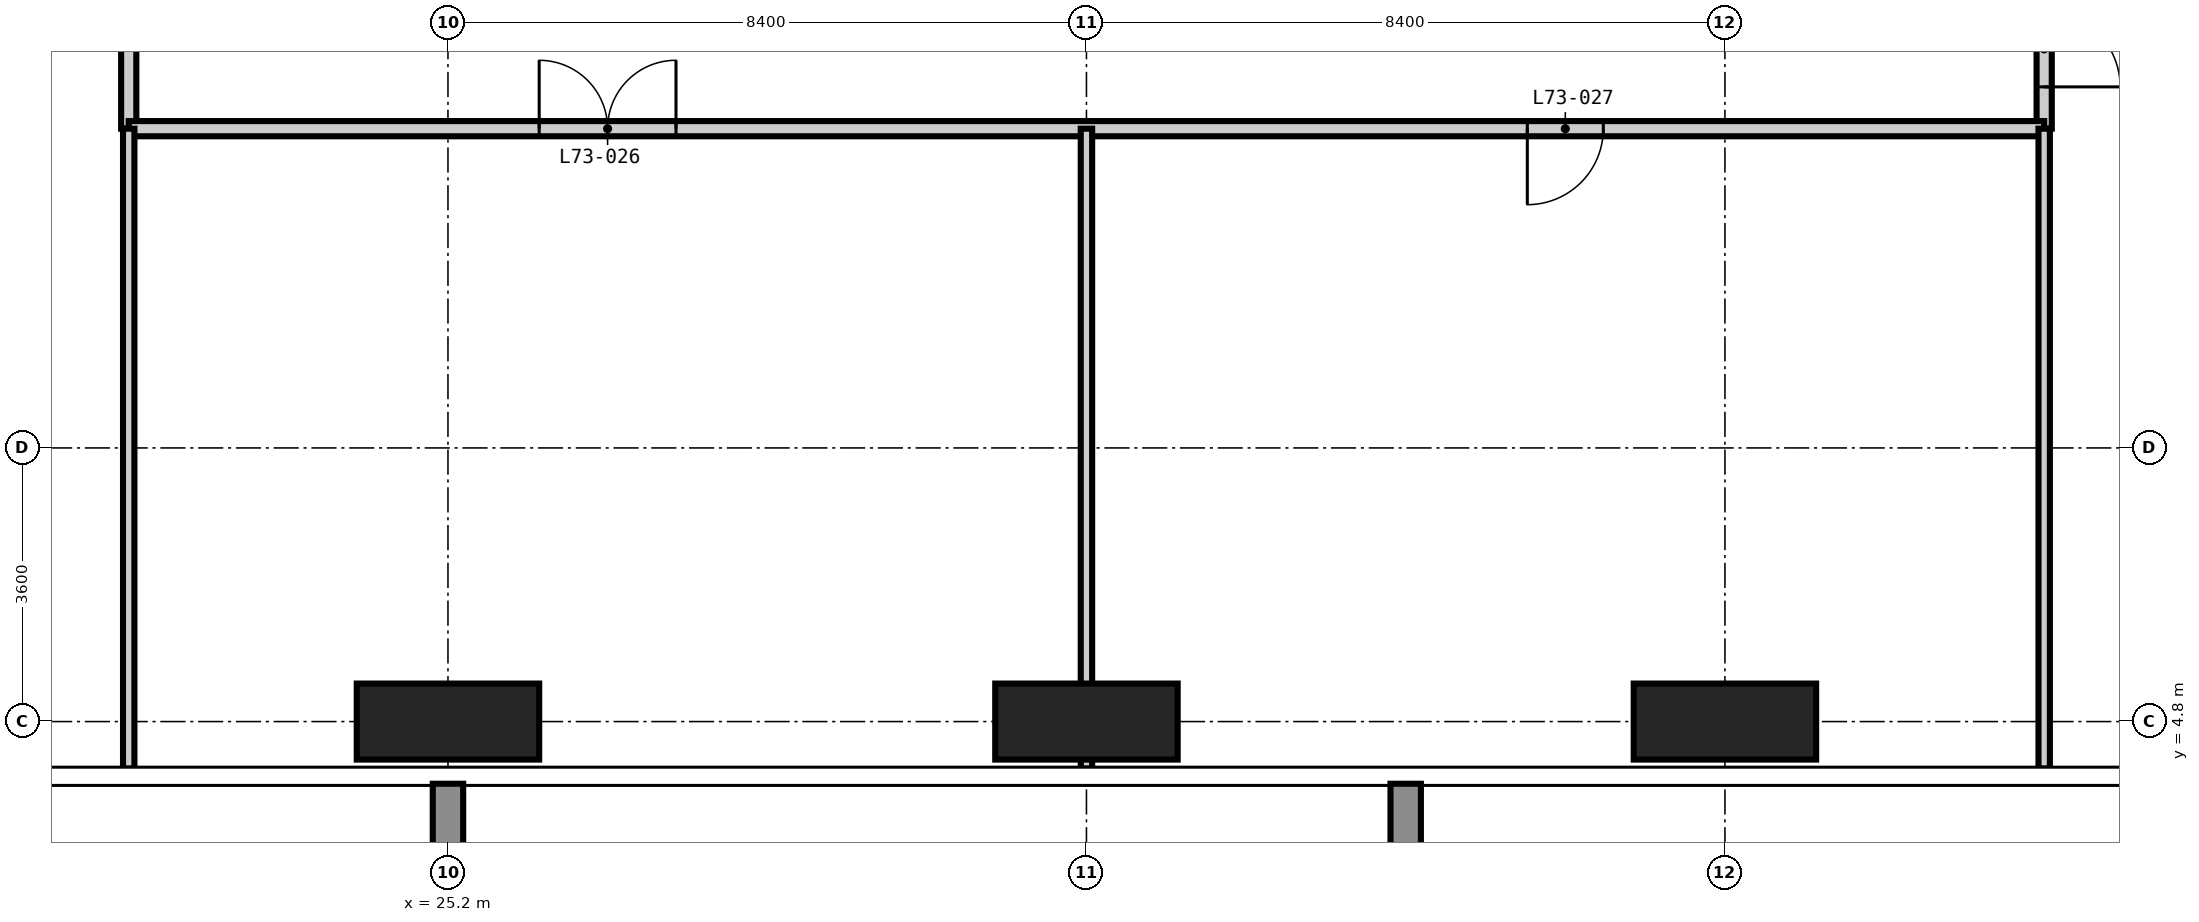
"""IFC4 building model, lengths in metres.
Left out: names, types, materials, properties, quantities, classifications, styles, units other than length and angle.
Written with IfcOpenShell. Run it as: python <this file> out.ifc"""

import sys

from ifc_helpers import new_model, si_unit, direction, frame, frame_2d, origin, origin_2d, place, context, subcontext, project, spatial, rectangle, extrude, element, fill, save


model = new_model("IFC4")
c1 = context("Model", 3, precision=1e-05, world=origin(), true_north=direction((0.0, 1.0)))
c2 = subcontext(c1, "Body", "Model", "MODEL_VIEW")
j1 = project(units=[si_unit("LENGTHUNIT", "METRE"), si_unit("PLANEANGLEUNIT", "RADIAN")], contexts=[c1])
p1 = place(None, origin())
s1 = spatial("IfcSite", under=j1, at=p1, CompositionType="ELEMENT")
p2 = place(p1, origin())
s2 = spatial("IfcBuilding", under=s1, at=p2, CompositionType="ELEMENT")
p3 = place(p2, frame((0.0, 0.0, 284.1)))
s3 = spatial("IfcBuildingStorey", under=s2, at=p3, CompositionType="ELEMENT", Elevation=284.1)
for number, where, z_axis, x_axis in (
    (1, (25.2, 4.8, -0.35), (0.0, 0.0, 1.0), (1.0, 0.0, 0.0)),
    (2, (33.6, 4.8, -0.35), (0.0, 0.0, 1.0), (1.0, 0.0, 0.0)),
    (3, (42.0, 4.8, -0.35), (0.0, 0.0, 1.0), (1.0, 0.0, 0.0)),
):
    element("IfcColumn", number, at=place(p3, frame(where, z_axis=z_axis, x_axis=x_axis)), inside=s3, PredefinedType="COLUMN", context=c2, shape_type="SweptSolid", body=[
        extrude(rectangle(XDim=2.4, YDim=1.0, at=origin_2d()), origin(), (0.0, 0.0, 1.0), 5.0),
    ])
p4 = place(p3, frame((21.0, 12.6, 0.0), z_axis=(0.0, 0.0, 1.0), x_axis=(0.0, 1.0, 0.0)))
e4 = element("IfcWall", 4, at=p4, inside=s3, PredefinedType="PARTITIONING", context=c2, shape_type="SweptSolid", body=[
    extrude(rectangle(XDim=21.0, YDim=0.2, at=frame_2d((10.5, 0.0))), origin(), (0.0, 0.0, 1.0), 4.65),
])
p5 = place(p4, frame((15.9, 0.0, 0.0)))
e5 = element("IfcOpeningElement", 5, at=p5, cuts=e4, PredefinedType="OPENING", context=c2, shape_type="SweptSolid", body=[
    extrude(rectangle(XDim=1.8, YDim=2.4, at=frame_2d((0.9, 1.2))), frame((0.0, 0.11, 0.0), z_axis=(0.0, -1.0, 0.0), x_axis=(1.0, 0.0, 0.0)), (0.0, 0.0, 1.0), 0.22),
])
p6 = place(p4, frame((5.8, 0.0, 0.0)))
e6 = element("IfcOpeningElement", 6, at=p6, cuts=e4, PredefinedType="OPENING", context=c2, shape_type="SweptSolid", body=[
    extrude(rectangle(XDim=1.0, YDim=2.1, at=frame_2d((0.5, 1.05))), frame((0.0, 0.11, 0.0), z_axis=(0.0, -1.0, 0.0), x_axis=(1.0, 0.0, 0.0)), (0.0, 0.0, 1.0), 0.22),
])
p7 = place(p3, frame((46.2, 12.6, 0.0), z_axis=(0.0, 0.0, 1.0), x_axis=(0.0, 1.0, 0.0)))
e7 = element("IfcWall", 7, at=p7, inside=s3, PredefinedType="PARTITIONING", context=c2, shape_type="SweptSolid", body=[
    extrude(rectangle(XDim=12.6, YDim=0.2, at=frame_2d((6.3, 0.0))), origin(), (0.0, 0.0, 1.0), 4.65),
])
p8 = place(p7, frame((4.35, 0.0, 0.0)))
e8 = element("IfcOpeningElement", 8, at=p8, cuts=e7, PredefinedType="OPENING", context=c2, shape_type="SweptSolid", body=[
    extrude(rectangle(XDim=1.8, YDim=2.4, at=frame_2d((0.9, 1.2))), frame((0.0, 0.11, 0.0), z_axis=(0.0, -1.0, 0.0), x_axis=(1.0, 0.0, 0.0)), (0.0, 0.0, 1.0), 0.22),
])
p9 = place(p7, frame((0.55, 0.0, 0.0)))
e9 = element("IfcOpeningElement", 9, at=p9, cuts=e7, PredefinedType="OPENING", context=c2, shape_type="SweptSolid", body=[
    extrude(rectangle(XDim=1.0, YDim=2.1, at=frame_2d((0.5, 1.05))), frame((0.0, 0.11, 0.0), z_axis=(0.0, -1.0, 0.0), x_axis=(1.0, 0.0, 0.0)), (0.0, 0.0, 1.0), 0.22),
])
p10 = place(p7, frame((10.0, 0.0, 0.0)))
e10 = element("IfcOpeningElement", 10, at=p10, cuts=e7, PredefinedType="OPENING", context=c2, shape_type="SweptSolid", body=[
    extrude(rectangle(XDim=1.0, YDim=2.1, at=frame_2d((0.5, 1.05))), frame((0.0, 0.11, 0.0), z_axis=(0.0, -1.0, 0.0), x_axis=(1.0, 0.0, 0.0)), (0.0, 0.0, 1.0), 0.22),
])
p11 = place(p3, frame((21.0, 12.6, 0.0), z_axis=(0.0, 0.0, 1.0), x_axis=(1.0, 0.0, 0.0)))
e11 = element("IfcWall", 11, at=p11, inside=s3, PredefinedType="PARTITIONING", context=c2, shape_type="SweptSolid", body=[
    extrude(rectangle(XDim=25.2, YDim=0.2, at=frame_2d((12.6, 0.0))), origin(), (0.0, 0.0, 1.0), 4.65),
])
p12 = place(p11, frame((5.4, 0.0, 0.0)))
e12 = element("IfcOpeningElement", 12, at=p12, cuts=e11, PredefinedType="OPENING", context=c2, shape_type="SweptSolid", body=[
    extrude(rectangle(XDim=1.8, YDim=2.4, at=frame_2d((0.9, 1.2))), frame((0.0, 0.11, 0.0), z_axis=(0.0, -1.0, 0.0), x_axis=(1.0, 0.0, 0.0)), (0.0, 0.0, 1.0), 0.22),
])
p13 = place(p11, frame((18.4, 0.0, 0.0)))
e13 = element("IfcOpeningElement", 13, at=p13, cuts=e11, PredefinedType="OPENING", context=c2, shape_type="SweptSolid", body=[
    extrude(rectangle(XDim=1.0, YDim=2.1, at=frame_2d((0.5, 1.05))), frame((0.0, 0.11, 0.0), z_axis=(0.0, -1.0, 0.0), x_axis=(1.0, 0.0, 0.0)), (0.0, 0.0, 1.0), 0.22),
])
for number, where, z_axis, x_axis in (
    (14, (21.0, 4.182, 0.0), (0.0, 0.0, 1.0), (0.0, 1.0, 0.0)),
    (15, (33.6, 4.182, 0.0), (0.0, 0.0, 1.0), (0.0, 1.0, 0.0)),
    (16, (46.2, 4.182, 0.0), (0.0, 0.0, 1.0), (0.0, 1.0, 0.0)),
):
    element("IfcWall", number, at=place(p3, frame(where, z_axis=z_axis, x_axis=x_axis)), inside=s3, PredefinedType="PARTITIONING", context=c2, shape_type="SweptSolid", body=[
        extrude(rectangle(XDim=8.418, YDim=0.15, at=frame_2d((4.209, 0.0))), origin(), (0.0, 0.0, 1.0), 4.65),
    ])
p14 = place(p12, origin())
e17 = element("IfcDoor", 17, at=p14, inside=s3, OperationType="DOUBLE_DOOR_DOUBLE_SWING", PredefinedType="DOOR", context=c2, shape_type="SweptSolid", body=[
    extrude(rectangle(XDim=1.8, YDim=2.4, at=frame_2d((0.9, 1.2))), frame((0.0, 0.025, 0.0), z_axis=(0.0, -1.0, 0.0), x_axis=(1.0, 0.0, 0.0)), (0.0, 0.0, 1.0), 0.05),
])
fill(e12, e17)
p15 = place(p13, frame((1.0, 0.0, 0.0), z_axis=(0.0, 0.0, 1.0), x_axis=(-1.0, 0.0, 0.0)))
e18 = element("IfcDoor", 18, at=p15, inside=s3, OperationType="SINGLE_SWING_RIGHT", PredefinedType="DOOR", context=c2, shape_type="SweptSolid", body=[
    extrude(rectangle(XDim=1.0, YDim=2.1, at=frame_2d((0.5, 1.05))), frame((0.0, 0.025, 0.0), z_axis=(0.0, -1.0, 0.0), x_axis=(1.0, 0.0, 0.0)), (0.0, 0.0, 1.0), 0.05),
])
fill(e13, e18)
p16 = place(p9, frame((1.0, 0.0, 0.0), z_axis=(0.0, 0.0, 1.0), x_axis=(-1.0, 0.0, 0.0)))
e19 = element("IfcDoor", 19, at=p16, inside=s3, OperationType="SINGLE_SWING_RIGHT", PredefinedType="DOOR", context=c2, shape_type="SweptSolid", body=[
    extrude(rectangle(XDim=1.0, YDim=2.1, at=frame_2d((0.5, 1.05))), frame((0.0, 0.025, 0.0), z_axis=(0.0, -1.0, 0.0), x_axis=(1.0, 0.0, 0.0)), (0.0, 0.0, 1.0), 0.05),
])
fill(e9, e19)
save(model, sys.argv[1])
